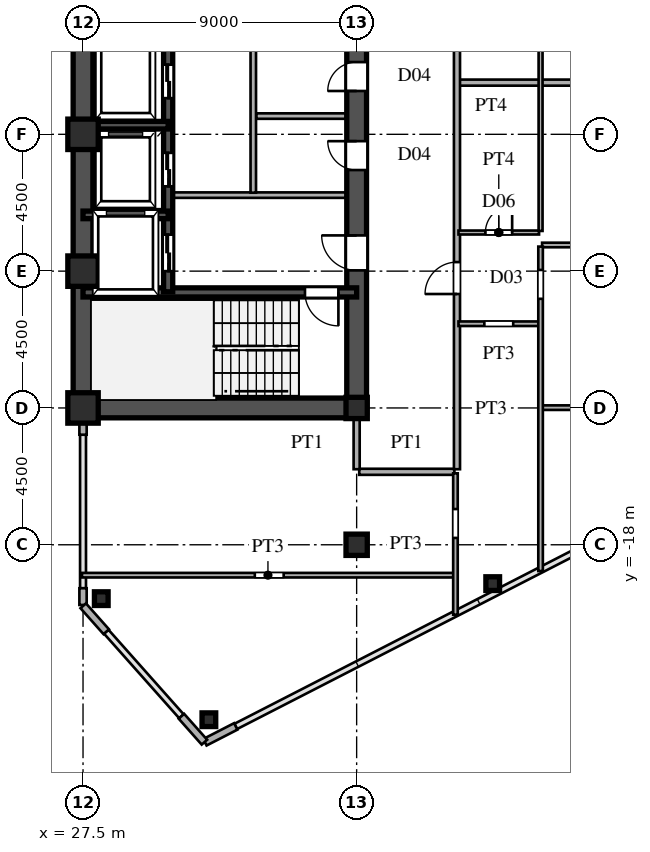
"""IFC4 building model, lengths in metres.
Left out: names, types, materials, properties, quantities, classifications, styles, units other than length and angle.
Written with IfcOpenShell. Run it as: python <this file> out.ifc"""

import sys

from ifc_helpers import new_model, si_unit, direction, frame, frame_2d, origin, origin_2d, place, context, subcontext, project, spatial, rectangle, hollow_rectangle, i_section, extrude, source, transform, mapped, element, fill, save


model = new_model("IFC4")
c1 = context("Model", 3, precision=1e-05, world=origin(), true_north=direction((0.0, 1.0)))
c2 = subcontext(c1, "Body", "Model", "MODEL_VIEW")
j1 = project(units=[si_unit("LENGTHUNIT", "METRE"), si_unit("PLANEANGLEUNIT", "RADIAN")], contexts=[c1])
p1 = place(None, origin())
s1 = spatial("IfcSite", under=j1, at=p1, CompositionType="ELEMENT")
p2 = place(p1, origin())
s2 = spatial("IfcBuilding", under=s1, at=p2, CompositionType="ELEMENT")
p3 = place(p2, frame((0.0, 0.0, 117.6)))
s3 = spatial("IfcBuildingStorey", under=s2, at=p3, CompositionType="ELEMENT", Elevation=117.6)
m1 = source(origin(), c2, "Body", "SweptSolid", [
    extrude(hollow_rectangle(XDim=1.0, YDim=1.0, WallThickness=0.042, at=origin_2d()), origin(), (0.0, 0.0, 1.0), 3.6),
])
for number, where, z_axis, x_axis in (
    (1, (27.5, -13.5, 0.0), (0.0, 0.0, 1.0), (1.0, 0.0, 0.0)),
    (2, (27.5, -9.0, 0.0), (0.0, 0.0, 1.0), (1.0, 0.0, 0.0)),
    (3, (27.5, -4.5, 0.0), (0.0, 0.0, 1.0), (1.0, 0.0, 0.0)),
):
    element("IfcColumn", number, at=place(p3, frame(where, z_axis=z_axis, x_axis=x_axis)), inside=s3, PredefinedType="COLUMN", context=c2, shape_type="MappedRepresentation", body=[
        mapped(m1, transform((0.0, 0.0, 0.0), scale=1.0)),
    ])
m2 = source(origin(), c2, "Body", "SweptSolid", [
    extrude(i_section(OverallWidth=0.7, OverallDepth=0.7, WebThickness=0.028, FlangeThickness=0.045, at=origin_2d()), origin(), (0.0, 0.0, 1.0), 3.6),
])
for number, where, z_axis, x_axis in (
    (4, (36.5, -18.0, 0.0), (0.0, 0.0, 1.0), (1.0, 0.0, 0.0)),
    (5, (36.5, -13.5, 0.0), (0.0, 0.0, 1.0), (1.0, 0.0, 0.0)),
):
    element("IfcColumn", number, at=place(p3, frame(where, z_axis=z_axis, x_axis=x_axis)), inside=s3, PredefinedType="COLUMN", context=c2, shape_type="MappedRepresentation", body=[
        mapped(m2, transform((0.0, 0.0, 0.0), scale=1.0)),
    ])
m3 = source(origin(), c2, "Body", "SweptSolid", [
    extrude(hollow_rectangle(XDim=0.45, YDim=0.45, WallThickness=0.018, at=origin_2d()), origin(), (0.0, 0.0, 1.0), 3.6),
])
for number, where, z_axis, x_axis in (
    (6, (31.64, -23.754, 0.0), (0.0, 0.0, 1.0), (1.0, 0.0, 0.0)),
    (7, (28.1, -19.772, 0.0), (0.0, 0.0, 1.0), (1.0, 0.0, 0.0)),
    (8, (40.976, -19.278, 0.0), (0.0, 0.0, 1.0), (1.0, 0.0, 0.0)),
):
    element("IfcColumn", number, at=place(p3, frame(where, z_axis=z_axis, x_axis=x_axis)), inside=s3, PredefinedType="COLUMN", context=c2, shape_type="MappedRepresentation", body=[
        mapped(m3, transform((0.0, 0.0, 0.0), scale=1.0)),
    ])
p4 = place(p3, frame((31.509, -24.495, 0.0), z_axis=(0.0, 0.0, 1.0), x_axis=(0.889797395748, 0.456355776255, 0.0)))
e9 = element("IfcWall", 9, at=p4, inside=s3, PredefinedType="SOLIDWALL", context=c2, shape_type="SweptSolid", body=[
    extrude(rectangle(XDim=1.14, YDim=0.24, at=frame_2d((0.57, 0.0))), origin(), (0.0, 0.0, 1.0), 3.38),
])
p5 = place(p3, frame((27.5, -19.98, 0.0), z_axis=(0.0, 0.0, 1.0), x_axis=(0.0, 1.0, 0.0)))
e10 = element("IfcWall", 10, at=p5, inside=s3, PredefinedType="SOLIDWALL", context=c2, shape_type="SweptSolid", body=[
    extrude(rectangle(XDim=0.55, YDim=0.24, at=frame_2d((0.275, 0.0))), origin(), (0.0, 0.0, 1.0), 3.38),
])
p6 = place(p3, frame((27.5, -14.38, 0.0), z_axis=(0.0, 0.0, 1.0), x_axis=(0.0, 1.0, 0.0)))
e11 = element("IfcWall", 11, at=p6, inside=s3, PredefinedType="SOLIDWALL", context=c2, shape_type="SweptSolid", body=[
    extrude(rectangle(XDim=0.55, YDim=0.24, at=frame_2d((0.275, 0.0))), origin(), (0.0, 0.0, 1.0), 2.88),
])
for number, where, z_axis, x_axis in (
    (12, (27.507, -20.008, 0.0), (0.0, 0.0, 1.0), (0.664, -0.747, 0.0)),
    (13, (30.736, -23.64, 0.0), (0.0, 0.0, 1.0), (0.664, -0.747, 0.0)),
):
    element("IfcWall", number, at=place(p3, frame(where, z_axis=z_axis, x_axis=x_axis)), inside=s3, PredefinedType="SOLIDWALL", context=c2, shape_type="SweptSolid", body=[
        extrude(rectangle(XDim=1.14, YDim=0.24, at=frame_2d((0.57, 0.0))), origin(), (0.0, 0.0, 1.0), 3.38),
    ])
p7 = place(p3, frame((27.5, -13.5, 0.0), z_axis=(0.0, 0.0, 1.0), x_axis=(0.0, 1.0, 0.0)))
e14 = element("IfcWall", 14, at=p7, inside=s3, PredefinedType="SHEAR", context=c2, shape_type="SweptSolid", body=[
    extrude(rectangle(XDim=12.2, YDim=0.65, at=frame_2d((6.1, 0.0))), origin(), (0.0, 0.0, 1.0), 3.38),
])
p8 = place(p3, frame((27.5, -13.5, 0.0), z_axis=(0.0, 0.0, 1.0), x_axis=(1.0, 0.0, 0.0)))
e15 = element("IfcWall", 15, at=p8, inside=s3, PredefinedType="SHEAR", context=c2, shape_type="SweptSolid", body=[
    extrude(rectangle(XDim=9.0, YDim=0.65, at=frame_2d((4.5, 0.0))), origin(), (0.0, 0.0, 1.0), 3.38),
])
p9 = place(p3, frame((36.5, -13.65, 0.0), z_axis=(0.0, 0.0, 1.0), x_axis=(0.0, 1.0, 0.0)))
e16 = element("IfcWall", 16, at=p9, inside=s3, PredefinedType="SHEAR", context=c2, shape_type="SweptSolid", body=[
    extrude(rectangle(XDim=7.15, YDim=0.65, at=frame_2d((3.575, 0.0))), origin(), (0.0, 0.0, 1.0), 3.38),
])
p10 = place(p9, frame((4.675, 0.0, 0.0)))
e17 = element("IfcOpeningElement", 17, at=p10, cuts=e16, PredefinedType="OPENING", context=c2, shape_type="SweptSolid", body=[
    extrude(rectangle(XDim=1.15, YDim=2.2, at=frame_2d((0.575, 1.1))), frame((0.0, 0.335, 0.0), z_axis=(0.0, -1.0, 0.0), x_axis=(1.0, 0.0, 0.0)), (0.0, 0.0, 1.0), 0.67),
])
p11 = place(p3, frame((36.5, -6.5, 0.0), z_axis=(0.0, 0.0, 1.0), x_axis=(0.0, 1.0, 0.0)))
e18 = element("IfcWall", 18, at=p11, inside=s3, PredefinedType="SHEAR", context=c2, shape_type="SweptSolid", body=[
    extrude(rectangle(XDim=2.6, YDim=0.65, at=frame_2d((1.3, 0.0))), origin(), (0.0, 0.0, 1.0), 3.38),
])
p12 = place(p11, frame((0.825, 0.0, 0.0)))
e19 = element("IfcOpeningElement", 19, at=p12, cuts=e18, PredefinedType="OPENING", context=c2, shape_type="SweptSolid", body=[
    extrude(rectangle(XDim=0.95, YDim=2.15, at=frame_2d((0.475, 1.075))), frame((0.0, 0.335, 0.0), z_axis=(0.0, -1.0, 0.0), x_axis=(1.0, 0.0, 0.0)), (0.0, 0.0, 1.0), 0.67),
])
p13 = place(p3, frame((36.5, -3.9, 0.0), z_axis=(0.0, 0.0, 1.0), x_axis=(0.0, 1.0, 0.0)))
e20 = element("IfcWall", 20, at=p13, inside=s3, PredefinedType="SHEAR", context=c2, shape_type="SweptSolid", body=[
    extrude(rectangle(XDim=2.6, YDim=0.65, at=frame_2d((1.3, 0.0))), origin(), (0.0, 0.0, 1.0), 3.38),
])
p14 = place(p13, frame((0.825, 0.0, 0.0)))
e21 = element("IfcOpeningElement", 21, at=p14, cuts=e20, PredefinedType="OPENING", context=c2, shape_type="SweptSolid", body=[
    extrude(rectangle(XDim=0.95, YDim=2.15, at=frame_2d((0.475, 1.075))), frame((0.0, 0.335, 0.0), z_axis=(0.0, -1.0, 0.0), x_axis=(1.0, 0.0, 0.0)), (0.0, 0.0, 1.0), 0.67),
])
p15 = place(p3, frame((27.5, -9.7, 0.0), z_axis=(0.0, 0.0, 1.0), x_axis=(1.0, 0.0, 0.0)))
e22 = element("IfcWall", 22, at=p15, inside=s3, PredefinedType="SHEAR", context=c2, shape_type="SweptSolid", body=[
    extrude(rectangle(XDim=9.0, YDim=0.3, at=frame_2d((4.5, 0.0))), origin(), (0.0, 0.0, 1.0), 3.38),
])
p16 = place(p15, frame((7.3, 0.0, 0.0)))
e23 = element("IfcOpeningElement", 23, at=p16, cuts=e22, PredefinedType="OPENING", context=c2, shape_type="SweptSolid", body=[
    extrude(rectangle(XDim=1.1, YDim=2.2, at=frame_2d((0.55, 1.1))), frame((0.0, 0.16, 0.0), z_axis=(0.0, -1.0, 0.0), x_axis=(1.0, 0.0, 0.0)), (0.0, 0.0, 1.0), 0.32),
])
for number, where, z_axis, x_axis in (
    (24, (27.5, -7.15, 0.0), (0.0, 0.0, 1.0), (1.0, 0.0, 0.0)),
    (25, (27.5, -4.2, 0.0), (0.0, 0.0, 1.0), (1.0, 0.0, 0.0)),
):
    element("IfcWall", number, at=place(p3, frame(where, z_axis=z_axis, x_axis=x_axis)), inside=s3, PredefinedType="SHEAR", context=c2, shape_type="SweptSolid", body=[
        extrude(rectangle(XDim=2.8, YDim=0.25, at=frame_2d((1.4, 0.0))), origin(), (0.0, 0.0, 1.0), 3.38),
    ])
p17 = place(p3, frame((30.3, -9.68, 0.0), z_axis=(0.0, 0.0, 1.0), x_axis=(0.0, 1.0, 0.0)))
e26 = element("IfcWall", 26, at=p17, inside=s3, PredefinedType="SHEAR", context=c2, shape_type="SweptSolid", body=[
    extrude(rectangle(XDim=2.56, YDim=0.3, at=frame_2d((1.28, 0.0))), origin(), (0.0, 0.0, 1.0), 3.38),
])
p18 = place(p17, frame((0.68, 0.0, 0.0)))
e27 = element("IfcOpeningElement", 27, at=p18, cuts=e26, PredefinedType="OPENING", context=c2, shape_type="SweptSolid", body=[
    extrude(rectangle(XDim=1.2, YDim=2.25, at=frame_2d((0.6, 1.125))), frame((0.0, 0.16, 0.0), z_axis=(0.0, -1.0, 0.0), x_axis=(1.0, 0.0, 0.0)), (0.0, 0.0, 1.0), 0.32),
])
p19 = place(p3, frame((30.3, -7.12, 0.0), z_axis=(0.0, 0.0, 1.0), x_axis=(0.0, 1.0, 0.0)))
e28 = element("IfcWall", 28, at=p19, inside=s3, PredefinedType="SHEAR", context=c2, shape_type="SweptSolid", body=[
    extrude(rectangle(XDim=2.92, YDim=0.3, at=frame_2d((1.46, 0.0))), origin(), (0.0, 0.0, 1.0), 3.38),
])
p20 = place(p19, frame((0.91, 0.0, 0.0)))
e29 = element("IfcOpeningElement", 29, at=p20, cuts=e28, PredefinedType="OPENING", context=c2, shape_type="SweptSolid", body=[
    extrude(rectangle(XDim=1.1, YDim=2.2, at=frame_2d((0.55, 1.1))), frame((0.0, 0.16, 0.0), z_axis=(0.0, -1.0, 0.0), x_axis=(1.0, 0.0, 0.0)), (0.0, 0.0, 1.0), 0.32),
])
p21 = place(p3, frame((30.3, -4.2, 0.0), z_axis=(0.0, 0.0, 1.0), x_axis=(0.0, 1.0, 0.0)))
e30 = element("IfcWall", 30, at=p21, inside=s3, PredefinedType="SHEAR", context=c2, shape_type="SweptSolid", body=[
    extrude(rectangle(XDim=2.88, YDim=0.3, at=frame_2d((1.44, 0.0))), origin(), (0.0, 0.0, 1.0), 3.38),
])
p22 = place(p21, frame((0.89, 0.0, 0.0)))
e31 = element("IfcOpeningElement", 31, at=p22, cuts=e30, PredefinedType="OPENING", context=c2, shape_type="SweptSolid", body=[
    extrude(rectangle(XDim=1.1, YDim=2.2, at=frame_2d((0.55, 1.1))), frame((0.0, 0.16, 0.0), z_axis=(0.0, -1.0, 0.0), x_axis=(1.0, 0.0, 0.0)), (0.0, 0.0, 1.0), 0.32),
])
p23 = place(p3, frame((30.45, -6.5, 0.0), z_axis=(0.0, 0.0, 1.0), x_axis=(1.0, 0.0, 0.0)))
e32 = element("IfcWall", 32, at=p23, inside=s3, PredefinedType="PARTITIONING", context=c2, shape_type="SweptSolid", body=[
    extrude(rectangle(XDim=5.7, YDim=0.18, at=frame_2d((2.85, 0.0))), origin(), (0.0, 0.0, 1.0), 3.38),
])
p24 = place(p3, frame((33.1, -6.42, 0.0), z_axis=(0.0, 0.0, 1.0), x_axis=(0.0, 1.0, 0.0)))
e33 = element("IfcWall", 33, at=p24, inside=s3, PredefinedType="PARTITIONING", context=c2, shape_type="SweptSolid", body=[
    extrude(rectangle(XDim=5.04, YDim=0.18, at=frame_2d((2.52, 0.0))), origin(), (0.0, 0.0, 1.0), 3.38),
])
p25 = place(p3, frame((33.2, -3.9, 0.0), z_axis=(0.0, 0.0, 1.0), x_axis=(1.0, 0.0, 0.0)))
e34 = element("IfcWall", 34, at=p25, inside=s3, PredefinedType="PARTITIONING", context=c2, shape_type="SweptSolid", body=[
    extrude(rectangle(XDim=2.95, YDim=0.18, at=frame_2d((1.475, 0.0))), origin(), (0.0, 0.0, 1.0), 3.38),
])
p26 = place(p3, frame((27.465, -19.0, 0.0), z_axis=(0.0, 0.0, 1.0), x_axis=(1.0, 0.0, 0.0)))
e35 = element("IfcWall", 35, at=p26, inside=s3, PredefinedType="PARTITIONING", context=c2, shape_type="SweptSolid", body=[
    extrude(rectangle(XDim=12.235, YDim=0.15, at=frame_2d((6.117, 0.0))), origin(), (0.0, 0.0, 1.0), 3.38),
])
p27 = place(p26, frame((5.685, 0.0, 0.0)))
e36 = element("IfcOpeningElement", 36, at=p27, cuts=e35, PredefinedType="OPENING", context=c2, shape_type="SweptSolid", body=[
    extrude(rectangle(XDim=0.95, YDim=2.15, at=frame_2d((0.475, 1.075))), frame((0.0, 0.085, 0.0), z_axis=(0.0, -1.0, 0.0), x_axis=(1.0, 0.0, 0.0)), (0.0, 0.0, 1.0), 0.17),
])
p28 = place(p3, frame((36.585, -15.6, 0.0), z_axis=(0.0, 0.0, 1.0), x_axis=(1.0, 0.0, 0.0)))
e37 = element("IfcWall", 37, at=p28, inside=s3, PredefinedType="PARTITIONING", context=c2, shape_type="SweptSolid", body=[
    extrude(rectangle(XDim=3.13, YDim=0.2, at=frame_2d((1.565, 0.0))), origin(), (0.0, 0.0, 1.0), 3.38),
])
p29 = place(p3, frame((42.6, -13.49, 0.0), z_axis=(0.0, 0.0, 1.0), x_axis=(1.0, 0.0, 0.0)))
e38 = element("IfcWall", 38, at=p29, inside=s3, PredefinedType="PARTITIONING", context=c2, shape_type="SweptSolid", body=[
    extrude(rectangle(XDim=10.397, YDim=0.15, at=frame_2d((5.198, 0.0))), origin(), (0.0, 0.0, 1.0), 2.78),
])
p30 = place(p29, frame((3.285, 0.0, 0.0)))
e39 = element("IfcOpeningElement", 39, at=p30, cuts=e38, PredefinedType="OPENING", context=c2, shape_type="SweptSolid", body=[
    extrude(rectangle(XDim=0.95, YDim=2.15, at=frame_2d((0.475, 1.075))), frame((0.0, 0.085, 0.0), z_axis=(0.0, -1.0, 0.0), x_axis=(1.0, 0.0, 0.0)), (0.0, 0.0, 1.0), 0.17),
])
p31 = place(p3, frame((39.85, -10.73, 0.0), z_axis=(0.0, 0.0, 1.0), x_axis=(1.0, 0.0, 0.0)))
e40 = element("IfcWall", 40, at=p31, inside=s3, PredefinedType="PARTITIONING", context=c2, shape_type="SweptSolid", body=[
    extrude(rectangle(XDim=2.65, YDim=0.15, at=frame_2d((1.325, 0.0))), origin(), (0.0, 0.0, 1.0), 3.38),
])
p32 = place(p31, frame((0.85, 0.0, 0.0)))
e41 = element("IfcOpeningElement", 41, at=p32, cuts=e40, PredefinedType="OPENING", context=c2, shape_type="SweptSolid", body=[
    extrude(rectangle(XDim=0.95, YDim=2.15, at=frame_2d((0.475, 1.075))), frame((0.0, 0.085, 0.0), z_axis=(0.0, -1.0, 0.0), x_axis=(1.0, 0.0, 0.0)), (0.0, 0.0, 1.0), 0.17),
])
p33 = place(p3, frame((42.6, -8.14, 0.0), z_axis=(0.0, 0.0, 1.0), x_axis=(1.0, 0.0, 0.0)))
e42 = element("IfcWall", 42, at=p33, inside=s3, PredefinedType="PARTITIONING", context=c2, shape_type="SweptSolid", body=[
    extrude(rectangle(XDim=20.81, YDim=0.15, at=frame_2d((10.405, 0.0))), origin(), (0.0, 0.0, 1.0), 3.38),
])
p34 = place(p33, frame((2.462, 0.0, 0.0)))
e43 = element("IfcOpeningElement", 43, at=p34, cuts=e42, PredefinedType="OPENING", context=c2, shape_type="SweptSolid", body=[
    extrude(rectangle(XDim=0.95, YDim=2.15, at=frame_2d((0.475, 1.075))), frame((0.0, 0.085, 0.0), z_axis=(0.0, -1.0, 0.0), x_axis=(1.0, 0.0, 0.0)), (0.0, 0.0, 1.0), 0.17),
])
p35 = place(p33, frame((8.438, 0.0, 0.0)))
e44 = element("IfcOpeningElement", 44, at=p35, cuts=e42, PredefinedType="OPENING", context=c2, shape_type="SweptSolid", body=[
    extrude(rectangle(XDim=0.95, YDim=2.15, at=frame_2d((0.475, 1.075))), frame((0.0, 0.085, 0.0), z_axis=(0.0, -1.0, 0.0), x_axis=(1.0, 0.0, 0.0)), (0.0, 0.0, 1.0), 0.17),
])
p36 = place(p3, frame((39.85, -7.73, 0.0), z_axis=(0.0, 0.0, 1.0), x_axis=(1.0, 0.0, 0.0)))
e45 = element("IfcWall", 45, at=p36, inside=s3, PredefinedType="PARTITIONING", context=c2, shape_type="SweptSolid", body=[
    extrude(rectangle(XDim=2.65, YDim=0.13, at=frame_2d((1.325, 0.0))), origin(), (0.0, 0.0, 1.0), 3.38),
])
p37 = place(p36, frame((0.885, 0.0, 0.0)))
e46 = element("IfcOpeningElement", 46, at=p37, cuts=e45, PredefinedType="OPENING", context=c2, shape_type="SweptSolid", body=[
    extrude(rectangle(XDim=0.88, YDim=2.1, at=frame_2d((0.44, 1.05))), frame((0.0, 0.075, 0.0), z_axis=(0.0, -1.0, 0.0), x_axis=(1.0, 0.0, 0.0)), (0.0, 0.0, 1.0), 0.15),
])
p38 = place(p3, frame((39.88, -2.8, 0.0), z_axis=(0.0, 0.0, 1.0), x_axis=(1.0, 0.0, 0.0)))
e47 = element("IfcWall", 47, at=p38, inside=s3, PredefinedType="PARTITIONING", context=c2, shape_type="SweptSolid", body=[
    extrude(rectangle(XDim=29.625, YDim=0.2, at=frame_2d((14.812, 0.0))), origin(), (0.0, 0.0, 1.0), 3.38),
])
p39 = place(p3, frame((36.5, -15.515, 0.0), z_axis=(0.0, 0.0, 1.0), x_axis=(0.0, 1.0, 0.0)))
e48 = element("IfcWall", 48, at=p39, inside=s3, PredefinedType="PARTITIONING", context=c2, shape_type="SweptSolid", body=[
    extrude(rectangle(XDim=1.685, YDim=0.2, at=frame_2d((0.842, 0.0))), origin(), (0.0, 0.0, 1.0), 2.78),
])
p40 = place(p3, frame((39.75, -20.301, 0.0), z_axis=(0.0, 0.0, 1.0), x_axis=(0.0, 1.0, 0.0)))
e49 = element("IfcWall", 49, at=p40, inside=s3, PredefinedType="PARTITIONING", context=c2, shape_type="SweptSolid", body=[
    extrude(rectangle(XDim=4.651, YDim=0.15, at=frame_2d((2.326, 0.0))), origin(), (0.0, 0.0, 1.0), 3.38),
])
p41 = place(p40, frame((2.526, 0.0, 0.0)))
e50 = element("IfcOpeningElement", 50, at=p41, cuts=e49, PredefinedType="OPENING", context=c2, shape_type="SweptSolid", body=[
    extrude(rectangle(XDim=0.95, YDim=2.15, at=frame_2d((0.475, 1.075))), frame((0.0, 0.085, 0.0), z_axis=(0.0, -1.0, 0.0), x_axis=(1.0, 0.0, 0.0)), (0.0, 0.0, 1.0), 0.17),
])
p42 = place(p3, frame((39.8, -15.515, 0.0), z_axis=(0.0, 0.0, 1.0), x_axis=(0.0, 1.0, 0.0)))
e51 = element("IfcWall", 51, at=p42, inside=s3, PredefinedType="PARTITIONING", context=c2, shape_type="SweptSolid", body=[
    extrude(rectangle(XDim=31.03, YDim=0.2, at=frame_2d((15.515, 0.0))), origin(), (0.0, 0.0, 1.0), 3.38),
])
p43 = place(p42, frame((5.762, 0.0, 0.0)))
e52 = element("IfcOpeningElement", 52, at=p43, cuts=e51, PredefinedType="OPENING", context=c2, shape_type="SweptSolid", body=[
    extrude(rectangle(XDim=1.05, YDim=2.25, at=frame_2d((0.525, 1.125))), frame((0.0, 0.11, 0.0), z_axis=(0.0, -1.0, 0.0), x_axis=(1.0, 0.0, 0.0)), (0.0, 0.0, 1.0), 0.22),
])
p44 = place(p42, frame((18.301, 0.0, 0.0)))
e53 = element("IfcOpeningElement", 53, at=p44, cuts=e51, PredefinedType="OPENING", context=c2, shape_type="SweptSolid", body=[
    extrude(rectangle(XDim=1.05, YDim=2.25, at=frame_2d((0.525, 1.125))), frame((0.0, 0.11, 0.0), z_axis=(0.0, -1.0, 0.0), x_axis=(1.0, 0.0, 0.0)), (0.0, 0.0, 1.0), 0.22),
])
p45 = place(p42, frame((27.69, 0.0, 0.0)))
e54 = element("IfcOpeningElement", 54, at=p45, cuts=e51, PredefinedType="OPENING", context=c2, shape_type="SweptSolid", body=[
    extrude(rectangle(XDim=1.05, YDim=2.25, at=frame_2d((0.525, 1.125))), frame((0.0, 0.11, 0.0), z_axis=(0.0, -1.0, 0.0), x_axis=(1.0, 0.0, 0.0)), (0.0, 0.0, 1.0), 0.22),
])
p46 = place(p3, frame((42.55, -18.865, 0.0), z_axis=(0.0, 0.0, 1.0), x_axis=(0.0, 1.0, 0.0)))
e55 = element("IfcWall", 55, at=p46, inside=s3, PredefinedType="PARTITIONING", context=c2, shape_type="SweptSolid", body=[
    extrude(rectangle(XDim=10.672, YDim=0.15, at=frame_2d((5.336, 0.0))), origin(), (0.0, 0.0, 1.0), 3.38),
])
p47 = place(p46, frame((8.955, 0.0, 0.0)))
e56 = element("IfcOpeningElement", 56, at=p47, cuts=e55, PredefinedType="OPENING", context=c2, shape_type="SweptSolid", body=[
    extrude(rectangle(XDim=0.95, YDim=2.15, at=frame_2d((0.475, 1.075))), frame((0.0, 0.085, 0.0), z_axis=(0.0, -1.0, 0.0), x_axis=(1.0, 0.0, 0.0)), (0.0, 0.0, 1.0), 0.17),
])
p48 = place(p3, frame((42.55, -7.678, 0.0), z_axis=(0.0, 0.0, 1.0), x_axis=(0.0, 1.0, 0.0)))
e57 = element("IfcWall", 57, at=p48, inside=s3, PredefinedType="PARTITIONING", context=c2, shape_type="SweptSolid", body=[
    extrude(rectangle(XDim=8.228, YDim=0.13, at=frame_2d((4.114, 0.0))), origin(), (0.0, 0.0, 1.0), 3.38),
])
m4 = source(origin(), c2, "Body", "SweptSolid", [
    extrude(rectangle(XDim=1.15, YDim=2.2, at=frame_2d((0.575, 1.1))), frame((0.0, 0.025, 0.0), z_axis=(0.0, -1.0, 0.0), x_axis=(1.0, 0.0, 0.0)), (0.0, 0.0, 1.0), 0.05),
])
p49 = place(p10, origin())
e58 = element("IfcDoor", 58, at=p49, inside=s3, OperationType="SINGLE_SWING_RIGHT", PredefinedType="DOOR", context=c2, shape_type="MappedRepresentation", body=[
    mapped(m4, transform((0.0, 0.0, 0.0), scale=1.0)),
])
fill(e17, e58)
m5 = source(origin(), c2, "Body", "SweptSolid", [
    extrude(rectangle(XDim=0.95, YDim=2.15, at=frame_2d((0.475, 1.075))), frame((0.0, 0.025, 0.0), z_axis=(0.0, -1.0, 0.0), x_axis=(1.0, 0.0, 0.0)), (0.0, 0.0, 1.0), 0.05),
])
p50 = place(p12, origin())
e59 = element("IfcDoor", 59, at=p50, inside=s3, OperationType="SINGLE_SWING_RIGHT", PredefinedType="DOOR", context=c2, shape_type="MappedRepresentation", body=[
    mapped(m5, transform((0.0, 0.0, 0.0), scale=1.0)),
])
fill(e19, e59)
p51 = place(p14, origin())
e60 = element("IfcDoor", 60, at=p51, inside=s3, OperationType="SINGLE_SWING_LEFT", PredefinedType="DOOR", context=c2, shape_type="MappedRepresentation", body=[
    mapped(m5, transform((0.0, 0.0, 0.0), scale=1.0)),
])
fill(e21, e60)
m6 = source(origin(), c2, "Body", "SweptSolid", [
    extrude(rectangle(XDim=1.1, YDim=2.2, at=frame_2d((0.55, 1.1))), frame((0.0, 0.025, 0.0), z_axis=(0.0, -1.0, 0.0), x_axis=(1.0, 0.0, 0.0)), (0.0, 0.0, 1.0), 0.05),
])
p52 = place(p16, frame((1.1, 0.0, 0.0), z_axis=(0.0, 0.0, 1.0), x_axis=(-1.0, 0.0, 0.0)))
e61 = element("IfcDoor", 61, at=p52, inside=s3, OperationType="SINGLE_SWING_RIGHT", PredefinedType="DOOR", context=c2, shape_type="MappedRepresentation", body=[
    mapped(m6, transform((0.0, 0.0, 0.0), scale=1.0)),
])
fill(e23, e61)
m7 = source(origin(), c2, "Body", "SweptSolid", [
    extrude(rectangle(XDim=1.2, YDim=2.25, at=frame_2d((0.6, 1.125))), frame((0.0, 0.025, 0.0), z_axis=(0.0, -1.0, 0.0), x_axis=(1.0, 0.0, 0.0)), (0.0, 0.0, 1.0), 0.05),
])
p53 = place(p18, origin())
e62 = element("IfcDoor", 62, at=p53, inside=s3, OperationType="DOUBLE_DOOR_SLIDING", PredefinedType="DOOR", context=c2, shape_type="MappedRepresentation", body=[
    mapped(m7, transform((0.0, 0.0, 0.0), scale=1.0)),
])
fill(e27, e62)
m8 = source(origin(), c2, "Body", "SweptSolid", [
    extrude(rectangle(XDim=1.1, YDim=2.2, at=frame_2d((0.55, 1.1))), frame((0.0, 0.025, 0.0), z_axis=(0.0, -1.0, 0.0), x_axis=(1.0, 0.0, 0.0)), (0.0, 0.0, 1.0), 0.05),
])
p54 = place(p20, origin())
e63 = element("IfcDoor", 63, at=p54, inside=s3, OperationType="DOUBLE_DOOR_SLIDING", PredefinedType="DOOR", context=c2, shape_type="MappedRepresentation", body=[
    mapped(m8, transform((0.0, 0.0, 0.0), scale=1.0)),
])
fill(e29, e63)
p55 = place(p22, origin())
e64 = element("IfcDoor", 64, at=p55, inside=s3, OperationType="DOUBLE_DOOR_SLIDING", PredefinedType="DOOR", context=c2, shape_type="MappedRepresentation", body=[
    mapped(m8, transform((0.0, 0.0, 0.0), scale=1.0)),
])
fill(e31, e64)
m9 = source(origin(), c2, "Body", "SweptSolid", [
    extrude(rectangle(XDim=0.88, YDim=2.1, at=frame_2d((0.44, 1.05))), frame((0.0, 0.025, 0.0), z_axis=(0.0, -1.0, 0.0), x_axis=(1.0, 0.0, 0.0)), (0.0, 0.0, 1.0), 0.05),
])
p56 = place(p37, origin())
e65 = element("IfcDoor", 65, at=p56, inside=s3, OperationType="SINGLE_SWING_RIGHT", PredefinedType="DOOR", context=c2, shape_type="MappedRepresentation", body=[
    mapped(m9, transform((0.0, 0.0, 0.0), scale=1.0)),
])
fill(e46, e65)
m10 = source(origin(), c2, "Body", "SweptSolid", [
    extrude(rectangle(XDim=1.05, YDim=2.25, at=frame_2d((0.525, 1.125))), frame((0.0, 0.025, 0.0), z_axis=(0.0, -1.0, 0.0), x_axis=(1.0, 0.0, 0.0)), (0.0, 0.0, 1.0), 0.05),
])
p57 = place(p43, origin())
e66 = element("IfcDoor", 66, at=p57, inside=s3, OperationType="SINGLE_SWING_LEFT", PredefinedType="DOOR", context=c2, shape_type="MappedRepresentation", body=[
    mapped(m10, transform((0.0, 0.0, 0.0), scale=1.0)),
])
fill(e52, e66)
save(model, sys.argv[1])
